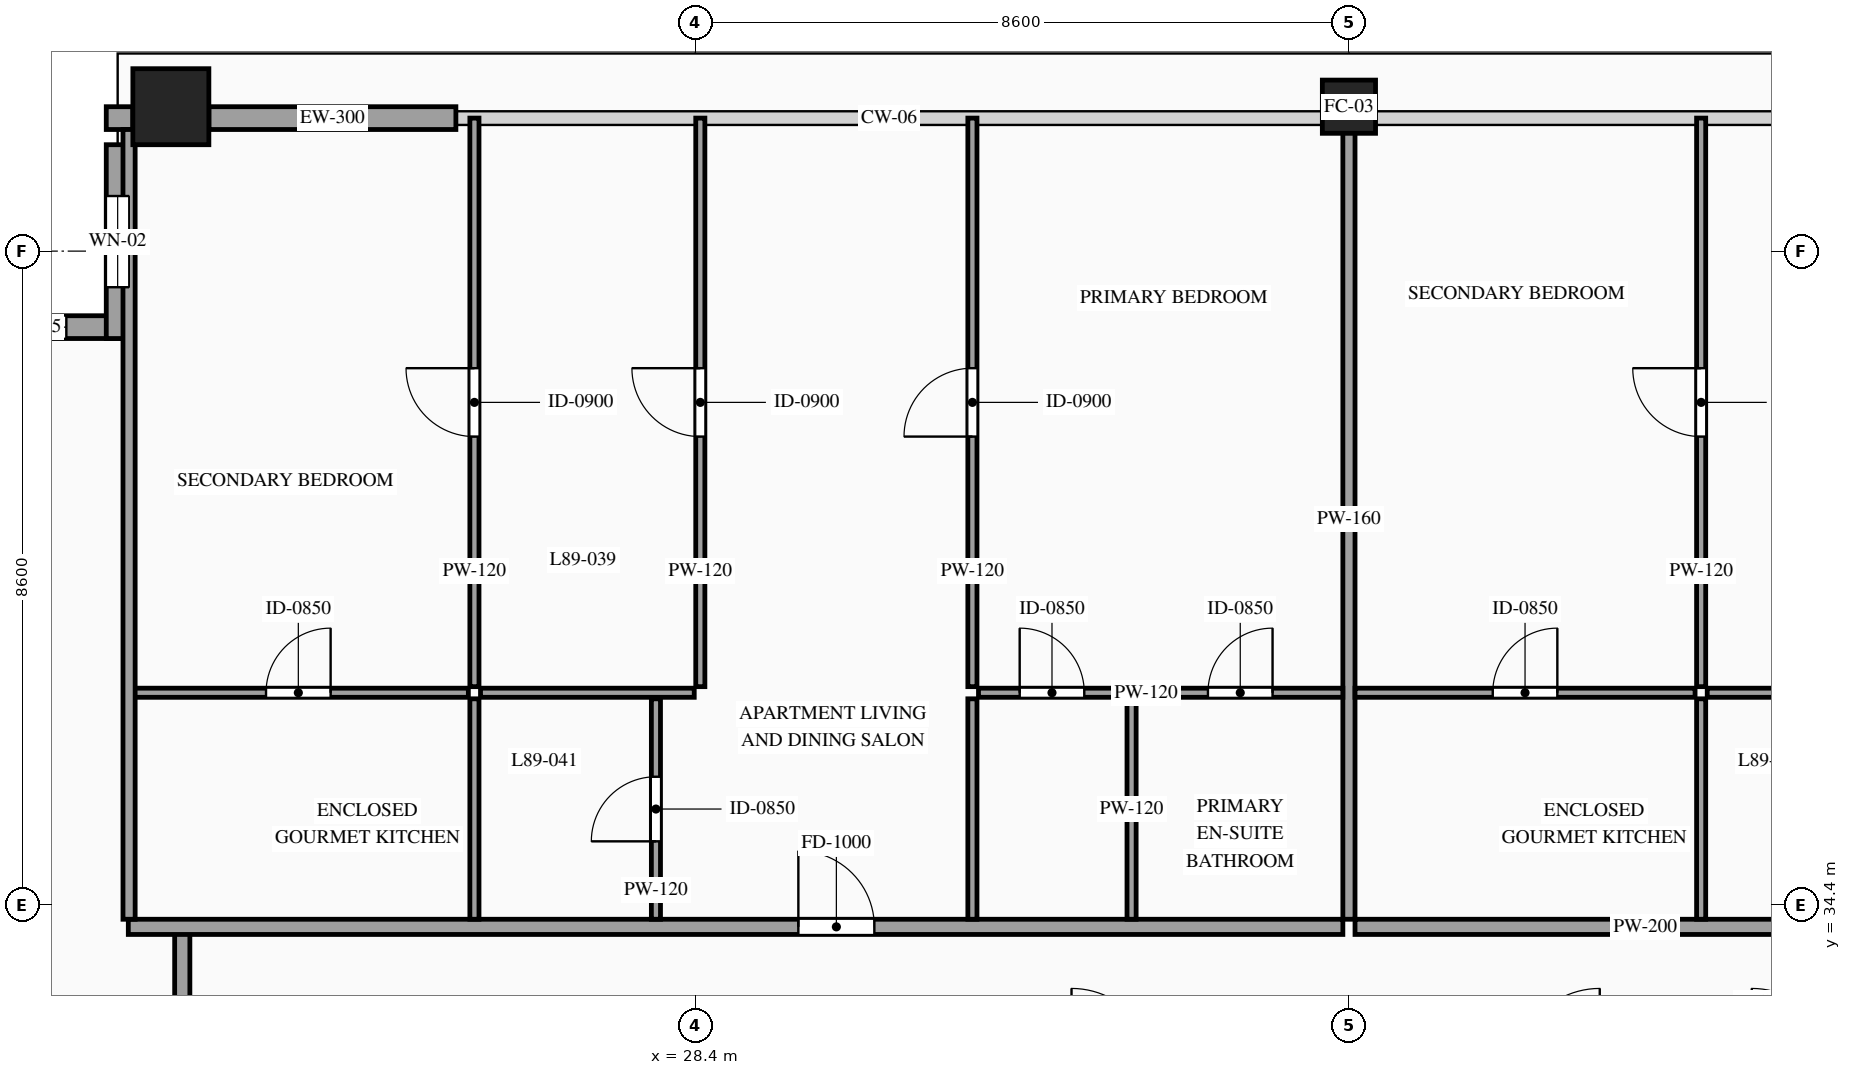
"""IFC4 building model, lengths in metres.
Left out: names, types, materials, properties, quantities, classifications, styles, units other than length and angle.
Written with IfcOpenShell. Run it as: python <this file> out.ifc"""

import sys

from ifc_helpers import new_model, si_unit, direction, frame, frame_2d, origin, origin_2d, place, context, subcontext, project, spatial, rectangle, hollow_rectangle, extrude, source, transform, mapped, element, fill, save


model = new_model("IFC4")
c1 = context("Model", 3, precision=1e-05, world=origin(), true_north=direction((0.0, 1.0)))
c2 = subcontext(c1, "Body", "Model", "MODEL_VIEW")
j1 = project(units=[si_unit("LENGTHUNIT", "METRE"), si_unit("PLANEANGLEUNIT", "RADIAN")], contexts=[c1])
p1 = place(None, origin())
s1 = spatial("IfcSite", under=j1, at=p1, CompositionType="ELEMENT")
p2 = place(p1, origin())
s2 = spatial("IfcBuilding", under=s1, at=p2, CompositionType="ELEMENT")
p3 = place(p2, frame((0.0, 0.0, 332.2)))
s3 = spatial("IfcBuildingStorey", under=s2, at=p3, CompositionType="ELEMENT", Elevation=332.2)
m1 = source(origin(), c2, "Body", "SweptSolid", [
    extrude(hollow_rectangle(XDim=1.0, YDim=1.0, WallThickness=0.048, at=origin_2d()), origin(), (0.0, 0.0, 1.0), 3.5),
])
p4 = place(p3, frame((21.5, 44.9, 0.0), z_axis=(0.0, 0.0, 1.0), x_axis=(1.0, 0.0, 0.0)))
e1 = element("IfcColumn", 1, at=p4, inside=s3, PredefinedType="COLUMN", context=c2, shape_type="MappedRepresentation", body=[
    mapped(m1, transform((0.0, 0.0, 0.0), scale=1.0)),
])
m2 = source(origin(), c2, "Body", "SweptSolid", [
    extrude(hollow_rectangle(XDim=0.7, YDim=0.7, WallThickness=0.032, at=origin_2d()), origin(), (0.0, 0.0, 1.0), 3.5),
])
p5 = place(p3, frame((37.0, 44.9, 0.0), z_axis=(0.0, 0.0, 1.0), x_axis=(1.0, 0.0, 0.0)))
e2 = element("IfcColumn", 2, at=p5, inside=s3, PredefinedType="COLUMN", context=c2, shape_type="MappedRepresentation", body=[
    mapped(m2, transform((0.0, 0.0, 0.0), scale=1.0)),
])
p6 = place(p3, frame((20.95, 42.0, 0.0), z_axis=(0.0, 0.0, 1.0), x_axis=(-1.0, 0.0, 0.0)))
e3 = element("IfcWall", 3, at=p6, inside=s3, PredefinedType="SOLIDWALL", context=c2, shape_type="SweptSolid", body=[
    extrude(rectangle(XDim=2.55, YDim=0.3, at=frame_2d((1.275, 0.0))), origin(), (0.0, 0.0, 1.0), 3.28),
])
p7 = place(p6, frame((0.825, 0.0, 0.85)))
e4 = element("IfcOpeningElement", 4, at=p7, cuts=e3, PredefinedType="OPENING", context=c2, shape_type="SweptSolid", body=[
    extrude(rectangle(XDim=0.9, YDim=1.5, at=frame_2d((0.45, 0.75))), frame((0.0, 0.165, 0.0), z_axis=(0.0, -1.0, 0.0), x_axis=(1.0, 0.0, 0.0)), (0.0, 0.0, 1.0), 0.33),
])
p8 = place(p3, frame((20.8, 44.4, 0.0), z_axis=(0.0, 0.0, 1.0), x_axis=(0.0, -1.0, 0.0)))
e5 = element("IfcWall", 5, at=p8, inside=s3, PredefinedType="SOLIDWALL", context=c2, shape_type="SweptSolid", body=[
    extrude(rectangle(XDim=2.55, YDim=0.3, at=frame_2d((1.275, 0.0))), origin(), (0.0, 0.0, 1.0), 3.28),
])
p9 = place(p8, frame((0.675, 0.0, 0.85)))
e6 = element("IfcOpeningElement", 6, at=p9, cuts=e5, PredefinedType="OPENING", context=c2, shape_type="SweptSolid", body=[
    extrude(rectangle(XDim=1.2, YDim=2.1, at=frame_2d((0.6, 1.05))), frame((0.0, 0.165, 0.0), z_axis=(0.0, -1.0, 0.0), x_axis=(1.0, 0.0, 0.0)), (0.0, 0.0, 1.0), 0.33),
])
m3 = source(origin(), c2, "Body", "SweptSolid", [
    extrude(rectangle(XDim=0.35, YDim=0.3, at=frame_2d((0.175, 0.0))), origin(), (0.0, 0.0, 1.0), 3.28),
])
p10 = place(p3, frame((20.65, 44.75, 0.0), z_axis=(0.0, 0.0, 1.0), x_axis=(1.0, 0.0, 0.0)))
e7 = element("IfcWall", 7, at=p10, inside=s3, PredefinedType="SOLIDWALL", context=c2, shape_type="MappedRepresentation", body=[
    mapped(m3, transform((0.0, 0.0, 0.0), scale=1.0)),
])
m4 = source(origin(), c2, "Body", "SweptSolid", [
    extrude(rectangle(XDim=3.25, YDim=0.3, at=frame_2d((1.625, 0.0))), origin(), (0.0, 0.0, 1.0), 2.885),
])
p11 = place(p3, frame((22.0, 44.75, 0.0), z_axis=(0.0, 0.0, 1.0), x_axis=(1.0, 0.0, 0.0)))
e8 = element("IfcWall", 8, at=p11, inside=s3, PredefinedType="SOLIDWALL", context=c2, shape_type="MappedRepresentation", body=[
    mapped(m4, transform((0.0, 0.0, 0.0), scale=1.0)),
])
m5 = source(origin(), c2, "Body", "SweptSolid", [
    extrude(rectangle(XDim=1.7, YDim=0.2, at=frame_2d((0.85, 0.0))), origin(), (0.0, 0.0, 1.0), 3.28),
])
p12 = place(p3, frame((21.65, 32.35, 0.0), z_axis=(0.0, 0.0, 1.0), x_axis=(0.0, 1.0, 0.0)))
e9 = element("IfcWall", 9, at=p12, inside=s3, PredefinedType="PARTITIONING", context=c2, shape_type="MappedRepresentation", body=[
    mapped(m5, transform((0.0, 0.0, 0.0), scale=1.0)),
])
p13 = place(p3, frame((20.94, 34.11, 0.0), z_axis=(0.0, 0.0, 1.0), x_axis=(1.0, 0.0, 0.0)))
e10 = element("IfcWall", 10, at=p13, inside=s3, PredefinedType="PARTITIONING", context=c2, shape_type="SweptSolid", body=[
    extrude(rectangle(XDim=15.98, YDim=0.2, at=frame_2d((7.99, 0.0))), origin(), (0.0, 0.0, 1.0), 3.28),
])
p14 = place(p13, frame((8.816, 0.0, 0.0)))
e11 = element("IfcOpeningElement", 11, at=p14, cuts=e10, PredefinedType="OPENING", context=c2, shape_type="SweptSolid", body=[
    extrude(rectangle(XDim=1.0, YDim=2.2, at=frame_2d((0.5, 1.1))), frame((0.0, 0.115, 0.0), z_axis=(0.0, -1.0, 0.0), x_axis=(1.0, 0.0, 0.0)), (0.0, 0.0, 1.0), 0.23),
])
m6 = source(origin(), c2, "Body", "SweptSolid", [
    extrude(rectangle(XDim=10.54, YDim=0.16, at=frame_2d((5.27, 0.0))), origin(), (0.0, 0.0, 1.0), 2.787),
])
p15 = place(p3, frame((37.0, 34.21, 0.0), z_axis=(0.0, 0.0, 1.0), x_axis=(0.0, 1.0, 0.0)))
e12 = element("IfcWall", 12, at=p15, inside=s3, PredefinedType="PARTITIONING", context=c2, shape_type="MappedRepresentation", body=[
    mapped(m6, transform((0.0, 0.0, 0.0), scale=1.0)),
])
p16 = place(p3, frame((20.94, 37.19, 0.0), z_axis=(0.0, 0.0, 1.0), x_axis=(1.0, 0.0, 0.0)))
e13 = element("IfcWall", 13, at=p16, inside=s3, PredefinedType="PARTITIONING", context=c2, shape_type="SweptSolid", body=[
    extrude(rectangle(XDim=4.474, YDim=0.12, at=frame_2d((2.237, 0.0))), origin(), (0.0, 0.0, 1.0), 3.28),
])
p17 = place(p16, frame((1.812, 0.0, 0.0)))
e14 = element("IfcOpeningElement", 14, at=p17, cuts=e13, PredefinedType="OPENING", context=c2, shape_type="SweptSolid", body=[
    extrude(rectangle(XDim=0.85, YDim=2.1, at=frame_2d((0.425, 1.05))), frame((0.0, 0.075, 0.0), z_axis=(0.0, -1.0, 0.0), x_axis=(1.0, 0.0, 0.0)), (0.0, 0.0, 1.0), 0.15),
])
m7 = source(origin(), c2, "Body", "SweptSolid", [
    extrude(rectangle(XDim=2.9, YDim=0.12, at=frame_2d((1.45, 0.0))), origin(), (0.0, 0.0, 1.0), 3.28),
])
p18 = place(p3, frame((25.494, 34.21, 0.0), z_axis=(0.0, 0.0, 1.0), x_axis=(0.0, 1.0, 0.0)))
e15 = element("IfcWall", 15, at=p18, inside=s3, PredefinedType="PARTITIONING", context=c2, shape_type="MappedRepresentation", body=[
    mapped(m7, transform((0.0, 0.0, 0.0), scale=1.0)),
])
p19 = place(p3, frame((27.882, 34.21, 0.0), z_axis=(0.0, 0.0, 1.0), x_axis=(0.0, 1.0, 0.0)))
e16 = element("IfcWall", 16, at=p19, inside=s3, PredefinedType="PARTITIONING", context=c2, shape_type="SweptSolid", body=[
    extrude(rectangle(XDim=2.9, YDim=0.12, at=frame_2d((1.45, 0.0))), origin(), (0.0, 0.0, 1.0), 3.28),
])
p20 = place(p19, frame((1.025, 0.0, 0.0)))
e17 = element("IfcOpeningElement", 17, at=p20, cuts=e16, PredefinedType="OPENING", context=c2, shape_type="SweptSolid", body=[
    extrude(rectangle(XDim=0.85, YDim=2.1, at=frame_2d((0.425, 1.05))), frame((0.0, 0.075, 0.0), z_axis=(0.0, -1.0, 0.0), x_axis=(1.0, 0.0, 0.0)), (0.0, 0.0, 1.0), 0.15),
])
for number, where, z_axis, x_axis in (
    (18, (34.14, 34.21, 0.0), (0.0, 0.0, 1.0), (0.0, 1.0, 0.0)),
    (19, (32.046, 34.21, 0.0), (0.0, 0.0, 1.0), (0.0, 1.0, 0.0)),
):
    element("IfcWall", number, at=place(p3, frame(where, z_axis=z_axis, x_axis=x_axis)), inside=s3, PredefinedType="PARTITIONING", context=c2, shape_type="MappedRepresentation", body=[
        mapped(m7, transform((0.0, 0.0, 0.0), scale=1.0)),
    ])
p21 = place(p3, frame((25.494, 37.27, 0.0), z_axis=(0.0, 0.0, 1.0), x_axis=(0.0, 1.0, 0.0)))
e20 = element("IfcWall", 20, at=p21, inside=s3, PredefinedType="PARTITIONING", context=c2, shape_type="SweptSolid", body=[
    extrude(rectangle(XDim=7.48, YDim=0.12, at=frame_2d((3.74, 0.0))), origin(), (0.0, 0.0, 1.0), 3.28),
])
p22 = place(p21, frame((3.29, 0.0, 0.0)))
e21 = element("IfcOpeningElement", 21, at=p22, cuts=e20, PredefinedType="OPENING", context=c2, shape_type="SweptSolid", body=[
    extrude(rectangle(XDim=0.9, YDim=2.15, at=frame_2d((0.45, 1.075))), frame((0.0, 0.075, 0.0), z_axis=(0.0, -1.0, 0.0), x_axis=(1.0, 0.0, 0.0)), (0.0, 0.0, 1.0), 0.15),
])
p23 = place(p3, frame((32.126, 37.19, 0.0), z_axis=(0.0, 0.0, 1.0), x_axis=(1.0, 0.0, 0.0)))
e22 = element("IfcWall", 22, at=p23, inside=s3, PredefinedType="PARTITIONING", context=c2, shape_type="SweptSolid", body=[
    extrude(rectangle(XDim=4.794, YDim=0.12, at=frame_2d((2.397, 0.0))), origin(), (0.0, 0.0, 1.0), 3.28),
])
p24 = place(p23, frame((3.019, 0.0, 0.0)))
e23 = element("IfcOpeningElement", 23, at=p24, cuts=e22, PredefinedType="OPENING", context=c2, shape_type="SweptSolid", body=[
    extrude(rectangle(XDim=0.85, YDim=2.1, at=frame_2d((0.425, 1.05))), frame((0.0, 0.075, 0.0), z_axis=(0.0, -1.0, 0.0), x_axis=(1.0, 0.0, 0.0)), (0.0, 0.0, 1.0), 0.15),
])
p25 = place(p23, frame((0.542, 0.0, 0.0)))
e24 = element("IfcOpeningElement", 24, at=p25, cuts=e22, PredefinedType="OPENING", context=c2, shape_type="SweptSolid", body=[
    extrude(rectangle(XDim=0.85, YDim=2.1, at=frame_2d((0.425, 1.05))), frame((0.0, 0.075, 0.0), z_axis=(0.0, -1.0, 0.0), x_axis=(1.0, 0.0, 0.0)), (0.0, 0.0, 1.0), 0.15),
])
p26 = place(p3, frame((32.046, 37.27, 0.0), z_axis=(0.0, 0.0, 1.0), x_axis=(0.0, 1.0, 0.0)))
e25 = element("IfcWall", 25, at=p26, inside=s3, PredefinedType="PARTITIONING", context=c2, shape_type="SweptSolid", body=[
    extrude(rectangle(XDim=7.48, YDim=0.12, at=frame_2d((3.74, 0.0))), origin(), (0.0, 0.0, 1.0), 3.28),
])
p27 = place(p26, frame((3.29, 0.0, 0.0)))
e26 = element("IfcOpeningElement", 26, at=p27, cuts=e25, PredefinedType="OPENING", context=c2, shape_type="SweptSolid", body=[
    extrude(rectangle(XDim=0.9, YDim=2.15, at=frame_2d((0.45, 1.075))), frame((0.0, 0.075, 0.0), z_axis=(0.0, -1.0, 0.0), x_axis=(1.0, 0.0, 0.0)), (0.0, 0.0, 1.0), 0.15),
])
m8 = source(origin(), c2, "Body", "SweptSolid", [
    extrude(rectangle(XDim=2.812, YDim=0.12, at=frame_2d((1.406, 0.0))), origin(), (0.0, 0.0, 1.0), 3.28),
])
p28 = place(p3, frame((25.574, 37.19, 0.0), z_axis=(0.0, 0.0, 1.0), x_axis=(1.0, 0.0, 0.0)))
e27 = element("IfcWall", 27, at=p28, inside=s3, PredefinedType="PARTITIONING", context=c2, shape_type="MappedRepresentation", body=[
    mapped(m8, transform((0.0, 0.0, 0.0), scale=1.0)),
])
p29 = place(p3, frame((28.466, 37.27, 0.0), z_axis=(0.0, 0.0, 1.0), x_axis=(0.0, 1.0, 0.0)))
e28 = element("IfcWall", 28, at=p29, inside=s3, PredefinedType="PARTITIONING", context=c2, shape_type="SweptSolid", body=[
    extrude(rectangle(XDim=7.48, YDim=0.12, at=frame_2d((3.74, 0.0))), origin(), (0.0, 0.0, 1.0), 3.28),
])
p30 = place(p29, frame((3.29, 0.0, 0.0)))
e29 = element("IfcOpeningElement", 29, at=p30, cuts=e28, PredefinedType="OPENING", context=c2, shape_type="SweptSolid", body=[
    extrude(rectangle(XDim=0.9, YDim=2.15, at=frame_2d((0.45, 1.075))), frame((0.0, 0.075, 0.0), z_axis=(0.0, -1.0, 0.0), x_axis=(1.0, 0.0, 0.0)), (0.0, 0.0, 1.0), 0.15),
])
p31 = place(p3, frame((37.08, 34.11, 0.0), z_axis=(0.0, 0.0, 1.0), x_axis=(1.0, 0.0, 0.0)))
e30 = element("IfcWall", 30, at=p31, inside=s3, PredefinedType="PARTITIONING", context=c2, shape_type="SweptSolid", body=[
    extrude(rectangle(XDim=15.98, YDim=0.2, at=frame_2d((7.99, 0.0))), origin(), (0.0, 0.0, 1.0), 3.28),
])
p32 = place(p31, frame((7.888, 0.0, 0.0)))
e31 = element("IfcOpeningElement", 31, at=p32, cuts=e30, PredefinedType="OPENING", context=c2, shape_type="SweptSolid", body=[
    extrude(rectangle(XDim=1.0, YDim=2.2, at=frame_2d((0.5, 1.1))), frame((0.0, 0.115, 0.0), z_axis=(0.0, -1.0, 0.0), x_axis=(1.0, 0.0, 0.0)), (0.0, 0.0, 1.0), 0.23),
])
m9 = source(origin(), c2, "Body", "SweptSolid", [
    extrude(rectangle(XDim=10.39, YDim=0.16, at=frame_2d((5.195, 0.0))), origin(), (0.0, 0.0, 1.0), 3.28),
])
p33 = place(p3, frame((20.95, 34.21, 0.0), z_axis=(0.0, 0.0, 1.0), x_axis=(0.0, 1.0, 0.0)))
e32 = element("IfcWall", 32, at=p33, inside=s3, PredefinedType="PARTITIONING", context=c2, shape_type="MappedRepresentation", body=[
    mapped(m9, transform((0.0, 0.0, 0.0), scale=1.0)),
])
p34 = place(p3, frame((37.08, 37.19, 0.0), z_axis=(0.0, 0.0, 1.0), x_axis=(1.0, 0.0, 0.0)))
e33 = element("IfcWall", 33, at=p34, inside=s3, PredefinedType="PARTITIONING", context=c2, shape_type="SweptSolid", body=[
    extrude(rectangle(XDim=4.474, YDim=0.12, at=frame_2d((2.237, 0.0))), origin(), (0.0, 0.0, 1.0), 3.28),
])
p35 = place(p34, frame((1.812, 0.0, 0.0)))
e34 = element("IfcOpeningElement", 34, at=p35, cuts=e33, PredefinedType="OPENING", context=c2, shape_type="SweptSolid", body=[
    extrude(rectangle(XDim=0.85, YDim=2.1, at=frame_2d((0.425, 1.05))), frame((0.0, 0.075, 0.0), z_axis=(0.0, -1.0, 0.0), x_axis=(1.0, 0.0, 0.0)), (0.0, 0.0, 1.0), 0.15),
])
p36 = place(p3, frame((41.634, 34.21, 0.0), z_axis=(0.0, 0.0, 1.0), x_axis=(0.0, 1.0, 0.0)))
e35 = element("IfcWall", 35, at=p36, inside=s3, PredefinedType="PARTITIONING", context=c2, shape_type="MappedRepresentation", body=[
    mapped(m7, transform((0.0, 0.0, 0.0), scale=1.0)),
])
p37 = place(p3, frame((41.634, 37.27, 0.0), z_axis=(0.0, 0.0, 1.0), x_axis=(0.0, 1.0, 0.0)))
e36 = element("IfcWall", 36, at=p37, inside=s3, PredefinedType="PARTITIONING", context=c2, shape_type="SweptSolid", body=[
    extrude(rectangle(XDim=7.48, YDim=0.12, at=frame_2d((3.74, 0.0))), origin(), (0.0, 0.0, 1.0), 3.28),
])
p38 = place(p37, frame((3.29, 0.0, 0.0)))
e37 = element("IfcOpeningElement", 37, at=p38, cuts=e36, PredefinedType="OPENING", context=c2, shape_type="SweptSolid", body=[
    extrude(rectangle(XDim=0.9, YDim=2.15, at=frame_2d((0.45, 1.075))), frame((0.0, 0.075, 0.0), z_axis=(0.0, -1.0, 0.0), x_axis=(1.0, 0.0, 0.0)), (0.0, 0.0, 1.0), 0.15),
])
m10 = source(origin(), c2, "Body", "SweptSolid", [
    extrude(rectangle(XDim=2.812, YDim=0.12, at=frame_2d((1.406, 0.0))), origin(), (0.0, 0.0, 1.0), 3.28),
])
p39 = place(p3, frame((41.714, 37.19, 0.0), z_axis=(0.0, 0.0, 1.0), x_axis=(1.0, 0.0, 0.0)))
e38 = element("IfcWall", 38, at=p39, inside=s3, PredefinedType="PARTITIONING", context=c2, shape_type="MappedRepresentation", body=[
    mapped(m10, transform((0.0, 0.0, 0.0), scale=1.0)),
])
m11 = source(origin(), c2, "Body", "SweptSolid", [
    extrude(rectangle(XDim=0.9, YDim=1.5, at=frame_2d((0.45, 0.75))), frame((0.0, 0.03, 0.0), z_axis=(0.0, -1.0, 0.0), x_axis=(1.0, 0.0, 0.0)), (0.0, 0.0, 1.0), 0.06),
])
p40 = place(p7, origin())
e39 = element("IfcWindow", 39, at=p40, inside=s3, PartitioningType="SINGLE_PANEL", PredefinedType="WINDOW", context=c2, shape_type="MappedRepresentation", body=[
    mapped(m11, transform((0.0, 0.0, 0.0), scale=1.0)),
])
fill(e4, e39)
m12 = source(origin(), c2, "Body", "SweptSolid", [
    extrude(rectangle(XDim=1.2, YDim=2.1, at=frame_2d((0.6, 1.05))), frame((0.0, 0.03, 0.0), z_axis=(0.0, -1.0, 0.0), x_axis=(1.0, 0.0, 0.0)), (0.0, 0.0, 1.0), 0.06),
])
p41 = place(p9, origin())
e40 = element("IfcWindow", 40, at=p41, inside=s3, PartitioningType="SINGLE_PANEL", PredefinedType="WINDOW", context=c2, shape_type="MappedRepresentation", body=[
    mapped(m12, transform((0.0, 0.0, 0.0), scale=1.0)),
])
fill(e6, e40)
m13 = source(origin(), c2, "Body", "SweptSolid", [
    extrude(rectangle(XDim=1.0, YDim=2.2, at=frame_2d((0.5, 1.1))), frame((0.0, 0.025, 0.0), z_axis=(0.0, -1.0, 0.0), x_axis=(1.0, 0.0, 0.0)), (0.0, 0.0, 1.0), 0.05),
])
p42 = place(p14, origin())
e41 = element("IfcDoor", 41, at=p42, inside=s3, OperationType="SINGLE_SWING_LEFT", PredefinedType="DOOR", context=c2, shape_type="MappedRepresentation", body=[
    mapped(m13, transform((0.0, 0.0, 0.0), scale=1.0)),
])
fill(e11, e41)
m14 = source(origin(), c2, "Body", "SweptSolid", [
    extrude(rectangle(XDim=0.85, YDim=2.1, at=frame_2d((0.425, 1.05))), frame((0.0, 0.025, 0.0), z_axis=(0.0, -1.0, 0.0), x_axis=(1.0, 0.0, 0.0)), (0.0, 0.0, 1.0), 0.05),
])
p43 = place(p17, origin())
e42 = element("IfcDoor", 42, at=p43, inside=s3, OperationType="SINGLE_SWING_RIGHT", PredefinedType="DOOR", context=c2, shape_type="MappedRepresentation", body=[
    mapped(m14, transform((0.0, 0.0, 0.0), scale=1.0)),
])
fill(e14, e42)
p44 = place(p20, origin())
e43 = element("IfcDoor", 43, at=p44, inside=s3, OperationType="SINGLE_SWING_LEFT", PredefinedType="DOOR", context=c2, shape_type="MappedRepresentation", body=[
    mapped(m14, transform((0.0, 0.0, 0.0), scale=1.0)),
])
fill(e17, e43)
p45 = place(p24, origin())
e44 = element("IfcDoor", 44, at=p45, inside=s3, OperationType="SINGLE_SWING_RIGHT", PredefinedType="DOOR", context=c2, shape_type="MappedRepresentation", body=[
    mapped(m14, transform((0.0, 0.0, 0.0), scale=1.0)),
])
fill(e23, e44)
p46 = place(p25, origin())
e45 = element("IfcDoor", 45, at=p46, inside=s3, OperationType="SINGLE_SWING_LEFT", PredefinedType="DOOR", context=c2, shape_type="MappedRepresentation", body=[
    mapped(m14, transform((0.0, 0.0, 0.0), scale=1.0)),
])
fill(e24, e45)
m15 = source(origin(), c2, "Body", "SweptSolid", [
    extrude(rectangle(XDim=0.9, YDim=2.15, at=frame_2d((0.45, 1.075))), frame((0.0, 0.025, 0.0), z_axis=(0.0, -1.0, 0.0), x_axis=(1.0, 0.0, 0.0)), (0.0, 0.0, 1.0), 0.05),
])
p47 = place(p22, origin())
e46 = element("IfcDoor", 46, at=p47, inside=s3, OperationType="SINGLE_SWING_RIGHT", PredefinedType="DOOR", context=c2, shape_type="MappedRepresentation", body=[
    mapped(m15, transform((0.0, 0.0, 0.0), scale=1.0)),
])
fill(e21, e46)
p48 = place(p27, origin())
e47 = element("IfcDoor", 47, at=p48, inside=s3, OperationType="SINGLE_SWING_LEFT", PredefinedType="DOOR", context=c2, shape_type="MappedRepresentation", body=[
    mapped(m15, transform((0.0, 0.0, 0.0), scale=1.0)),
])
fill(e26, e47)
p49 = place(p30, origin())
e48 = element("IfcDoor", 48, at=p49, inside=s3, OperationType="SINGLE_SWING_RIGHT", PredefinedType="DOOR", context=c2, shape_type="MappedRepresentation", body=[
    mapped(m15, transform((0.0, 0.0, 0.0), scale=1.0)),
])
fill(e29, e48)
p50 = place(p35, origin())
e49 = element("IfcDoor", 49, at=p50, inside=s3, OperationType="SINGLE_SWING_RIGHT", PredefinedType="DOOR", context=c2, shape_type="MappedRepresentation", body=[
    mapped(m14, transform((0.0, 0.0, 0.0), scale=1.0)),
])
fill(e34, e49)
p51 = place(p38, origin())
e50 = element("IfcDoor", 50, at=p51, inside=s3, OperationType="SINGLE_SWING_RIGHT", PredefinedType="DOOR", context=c2, shape_type="MappedRepresentation", body=[
    mapped(m15, transform((0.0, 0.0, 0.0), scale=1.0)),
])
fill(e37, e50)
save(model, sys.argv[1])
